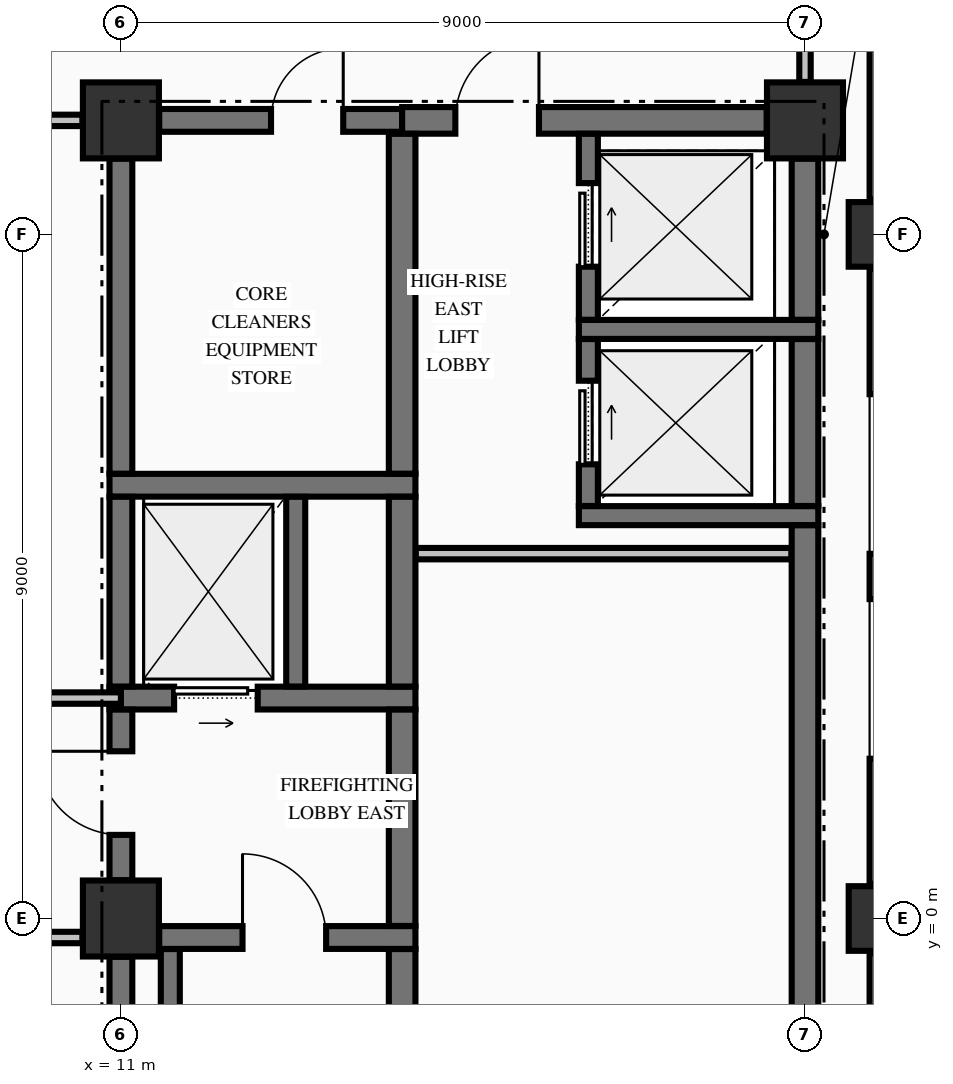
"""IFC4 building model, lengths in metres.
Left out: names, types, materials, properties, quantities, classifications, styles, units other than length and angle.
Written with IfcOpenShell. Run it as: python <this file> out.ifc"""

import sys

from ifc_helpers import new_model, si_unit, direction, frame, frame_2d, origin, origin_2d, place, context, subcontext, project, spatial, rectangle, extrude, element, fill, save


model = new_model("IFC4")
c1 = context("Model", 3, precision=1e-05, world=origin(), true_north=direction((0.0, 1.0)))
c2 = subcontext(c1, "Body", "Model", "MODEL_VIEW")
j1 = project(units=[si_unit("LENGTHUNIT", "METRE"), si_unit("PLANEANGLEUNIT", "RADIAN")], contexts=[c1])
p1 = place(None, origin())
s1 = spatial("IfcSite", under=j1, at=p1, CompositionType="ELEMENT")
p2 = place(p1, origin())
s2 = spatial("IfcBuilding", under=s1, at=p2, CompositionType="ELEMENT")
p3 = place(p2, frame((0.0, 0.0, 278.06)))
s3 = spatial("IfcBuildingStorey", under=s2, at=p3, CompositionType="ELEMENT", Elevation=278.06)
for number, where, z_axis, x_axis in (
    (1, (21.0, 0.0, -0.425), (0.0, 0.0, 1.0), (1.0, 0.0, 0.0)),
    (2, (21.0, 9.0, -0.425), (0.0, 0.0, 1.0), (1.0, 0.0, 0.0)),
):
    element("IfcColumn", number, at=place(p3, frame(where, z_axis=z_axis, x_axis=x_axis)), inside=s3, PredefinedType="COLUMN", context=c2, shape_type="SweptSolid", body=[
        extrude(rectangle(XDim=0.85, YDim=0.85, at=origin_2d()), origin(), (0.0, 0.0, 1.0), 3.84),
    ])
for number, where, z_axis, x_axis in (
    (3, (11.0, 0.0, -0.425), (0.0, 0.0, 1.0), (1.0, 0.0, 0.0)),
    (4, (11.0, 10.5, -0.425), (0.0, 0.0, 1.0), (1.0, 0.0, 0.0)),
    (5, (20.0, 10.5, -0.425), (0.0, 0.0, 1.0), (1.0, 0.0, 0.0)),
):
    element("IfcColumn", number, at=place(p3, frame(where, z_axis=z_axis, x_axis=x_axis)), inside=s3, PredefinedType="COLUMN", context=c2, shape_type="SweptSolid", body=[
        extrude(rectangle(XDim=1.0, YDim=1.0, at=origin_2d()), origin(), (0.0, 0.0, 1.0), 3.84),
    ])
p4 = place(p3, frame((21.0, -8.545, 0.0), z_axis=(0.0, 0.0, 1.0), x_axis=(0.0, 1.0, 0.0)))
e6 = element("IfcWall", 6, at=p4, inside=s3, PredefinedType="STANDARD", context=c2, shape_type="SweptSolid", body=[
    extrude(rectangle(XDim=8.09, YDim=0.3, at=frame_2d((4.045, 0.0))), origin(), (0.0, 0.0, 1.0), 2.807),
])
p5 = place(p4, frame((1.647, 0.0, 0.7)))
e7 = element("IfcOpeningElement", 7, at=p5, cuts=e6, PredefinedType="OPENING", context=c2, shape_type="SweptSolid", body=[
    extrude(rectangle(XDim=2.1, YDim=1.5, at=frame_2d((1.05, 0.75))), frame((0.0, 0.16, 0.0), z_axis=(0.0, -1.0, 0.0), x_axis=(1.0, 0.0, 0.0)), (0.0, 0.0, 1.0), 0.32),
])
p6 = place(p4, frame((4.343, 0.0, 0.7)))
e8 = element("IfcOpeningElement", 8, at=p6, cuts=e6, PredefinedType="OPENING", context=c2, shape_type="SweptSolid", body=[
    extrude(rectangle(XDim=2.1, YDim=1.5, at=frame_2d((1.05, 0.75))), frame((0.0, 0.16, 0.0), z_axis=(0.0, -1.0, 0.0), x_axis=(1.0, 0.0, 0.0)), (0.0, 0.0, 1.0), 0.32),
])
p7 = place(p3, frame((21.0, 0.455, 0.0), z_axis=(0.0, 0.0, 1.0), x_axis=(0.0, 1.0, 0.0)))
e9 = element("IfcWall", 9, at=p7, inside=s3, PredefinedType="STANDARD", context=c2, shape_type="SweptSolid", body=[
    extrude(rectangle(XDim=8.09, YDim=0.3, at=frame_2d((4.045, 0.0))), origin(), (0.0, 0.0, 1.0), 2.807),
])
p8 = place(p7, frame((1.647, 0.0, 0.7)))
e10 = element("IfcOpeningElement", 10, at=p8, cuts=e9, PredefinedType="OPENING", context=c2, shape_type="SweptSolid", body=[
    extrude(rectangle(XDim=2.1, YDim=1.5, at=frame_2d((1.05, 0.75))), frame((0.0, 0.16, 0.0), z_axis=(0.0, -1.0, 0.0), x_axis=(1.0, 0.0, 0.0)), (0.0, 0.0, 1.0), 0.32),
])
p9 = place(p7, frame((4.343, 0.0, 0.7)))
e11 = element("IfcOpeningElement", 11, at=p9, cuts=e9, PredefinedType="OPENING", context=c2, shape_type="SweptSolid", body=[
    extrude(rectangle(XDim=2.1, YDim=1.5, at=frame_2d((1.05, 0.75))), frame((0.0, 0.16, 0.0), z_axis=(0.0, -1.0, 0.0), x_axis=(1.0, 0.0, 0.0)), (0.0, 0.0, 1.0), 0.32),
])
p10 = place(p3, frame((21.0, 9.455, 0.0), z_axis=(0.0, 0.0, 1.0), x_axis=(0.0, 1.0, 0.0)))
e12 = element("IfcWall", 12, at=p10, inside=s3, PredefinedType="STANDARD", context=c2, shape_type="SweptSolid", body=[
    extrude(rectangle(XDim=8.09, YDim=0.3, at=frame_2d((4.045, 0.0))), origin(), (0.0, 0.0, 1.0), 1.607),
])
p11 = place(p3, frame((11.504, -0.25, 0.0), z_axis=(0.0, 0.0, 1.0), x_axis=(1.0, 0.0, 0.0)))
e13 = element("IfcWall", 13, at=p11, inside=s3, PredefinedType="SHEAR", context=c2, shape_type="SweptSolid", body=[
    extrude(rectangle(XDim=3.371, YDim=0.3, at=frame_2d((1.686, 0.0))), origin(), (0.0, 0.0, 1.0), 3.415),
])
p12 = place(p11, frame((1.096, 0.0, 0.0)))
e14 = element("IfcOpeningElement", 14, at=p12, cuts=e13, PredefinedType="OPENING", context=c2, shape_type="SweptSolid", body=[
    extrude(rectangle(XDim=1.1, YDim=2.15, at=frame_2d((0.55, 1.075))), frame((0.0, 0.16, 0.0), z_axis=(0.0, -1.0, 0.0), x_axis=(1.0, 0.0, 0.0)), (0.0, 0.0, 1.0), 0.32),
])
p13 = place(p3, frame((10.85, 2.9, 0.0), z_axis=(0.0, 0.0, 1.0), x_axis=(1.0, 0.0, 0.0)))
e15 = element("IfcWall", 15, at=p13, inside=s3, PredefinedType="SHEAR", context=c2, shape_type="SweptSolid", body=[
    extrude(rectangle(XDim=4.025, YDim=0.3, at=frame_2d((2.012, 0.0))), origin(), (0.0, 0.0, 1.0), 3.415),
])
p14 = place(p13, frame((0.85, 0.0, 0.0)))
e16 = element("IfcOpeningElement", 16, at=p14, cuts=e15, PredefinedType="OPENING", context=c2, shape_type="SweptSolid", body=[
    extrude(rectangle(XDim=1.1, YDim=2.2, at=frame_2d((0.55, 1.1))), frame((0.0, 0.16, 0.0), z_axis=(0.0, -1.0, 0.0), x_axis=(1.0, 0.0, 0.0)), (0.0, 0.0, 1.0), 0.32),
])
p15 = place(p3, frame((17.025, 5.3, 0.0), z_axis=(0.0, 0.0, 1.0), x_axis=(1.0, 0.0, 0.0)))
e17 = element("IfcWall", 17, at=p15, inside=s3, PredefinedType="SOLIDWALL", context=c2, shape_type="SweptSolid", body=[
    extrude(rectangle(XDim=3.15, YDim=0.25, at=frame_2d((1.575, 0.0))), origin(), (0.0, 0.0, 1.0), 3.415),
])
p16 = place(p3, frame((10.85, 5.7, 0.0), z_axis=(0.0, 0.0, 1.0), x_axis=(1.0, 0.0, 0.0)))
e18 = element("IfcWall", 18, at=p16, inside=s3, PredefinedType="SHEAR", context=c2, shape_type="SweptSolid", body=[
    extrude(rectangle(XDim=4.025, YDim=0.3, at=frame_2d((2.012, 0.0))), origin(), (0.0, 0.0, 1.0), 3.415),
])
p17 = place(p3, frame((17.025, 7.75, 0.0), z_axis=(0.0, 0.0, 1.0), x_axis=(1.0, 0.0, 0.0)))
e19 = element("IfcWall", 19, at=p17, inside=s3, PredefinedType="SOLIDWALL", context=c2, shape_type="SweptSolid", body=[
    extrude(rectangle(XDim=3.15, YDim=0.25, at=frame_2d((1.575, 0.0))), origin(), (0.0, 0.0, 1.0), 3.415),
])
p18 = place(p3, frame((11.504, 10.5, 0.0), z_axis=(0.0, 0.0, 1.0), x_axis=(1.0, 0.0, 0.0)))
e20 = element("IfcWall", 20, at=p18, inside=s3, PredefinedType="SHEAR", context=c2, shape_type="SweptSolid", body=[
    extrude(rectangle(XDim=3.196, YDim=0.3, at=frame_2d((1.598, 0.0))), origin(), (0.0, 0.0, 1.0), 3.415),
])
p19 = place(p18, frame((1.471, 0.0, 0.0)))
e21 = element("IfcOpeningElement", 21, at=p19, cuts=e20, PredefinedType="OPENING", context=c2, shape_type="SweptSolid", body=[
    extrude(rectangle(XDim=0.95, YDim=2.15, at=frame_2d((0.475, 1.075))), frame((0.0, 0.16, 0.0), z_axis=(0.0, -1.0, 0.0), x_axis=(1.0, 0.0, 0.0)), (0.0, 0.0, 1.0), 0.32),
])
p20 = place(p3, frame((14.7, 10.5, 0.0), z_axis=(0.0, 0.0, 1.0), x_axis=(1.0, 0.0, 0.0)))
e22 = element("IfcWall", 22, at=p20, inside=s3, PredefinedType="SHEAR", context=c2, shape_type="SweptSolid", body=[
    extrude(rectangle(XDim=4.796, YDim=0.35, at=frame_2d((2.398, 0.0))), origin(), (0.0, 0.0, 1.0), 3.415),
])
p21 = place(p20, frame((0.7, 0.0, 0.0)))
e23 = element("IfcOpeningElement", 23, at=p21, cuts=e22, PredefinedType="OPENING", context=c2, shape_type="SweptSolid", body=[
    extrude(rectangle(XDim=1.1, YDim=2.15, at=frame_2d((0.55, 1.075))), frame((0.0, 0.185, 0.0), z_axis=(0.0, -1.0, 0.0), x_axis=(1.0, 0.0, 0.0)), (0.0, 0.0, 1.0), 0.37),
])
p22 = place(p3, frame((-10.494, -0.25, 0.0), z_axis=(0.0, 0.0, 1.0), x_axis=(1.0, 0.0, 0.0)))
e24 = element("IfcWall", 24, at=p22, inside=s3, PredefinedType="PARTITIONING", context=c2, shape_type="SweptSolid", body=[
    extrude(rectangle(XDim=20.988, YDim=0.15, at=frame_2d((10.494, 0.0))), origin(), (0.0, 0.0, 1.0), 3.415),
])
p23 = place(p22, frame((6.244, 0.0, 0.0)))
e25 = element("IfcOpeningElement", 25, at=p23, cuts=e24, PredefinedType="OPENING", context=c2, shape_type="SweptSolid", body=[
    extrude(rectangle(XDim=1.1, YDim=2.15, at=frame_2d((0.55, 1.075))), frame((0.0, 0.085, 0.0), z_axis=(0.0, -1.0, 0.0), x_axis=(1.0, 0.0, 0.0)), (0.0, 0.0, 1.0), 0.17),
])
p24 = place(p22, frame((2.069, 0.0, 0.0)))
e26 = element("IfcOpeningElement", 26, at=p24, cuts=e24, PredefinedType="OPENING", context=c2, shape_type="SweptSolid", body=[
    extrude(rectangle(XDim=1.05, YDim=2.15, at=frame_2d((0.525, 1.075))), frame((0.0, 0.085, 0.0), z_axis=(0.0, -1.0, 0.0), x_axis=(1.0, 0.0, 0.0)), (0.0, 0.0, 1.0), 0.17),
])
p25 = place(p22, frame((14.219, 0.0, 0.0)))
e27 = element("IfcOpeningElement", 27, at=p25, cuts=e24, PredefinedType="OPENING", context=c2, shape_type="SweptSolid", body=[
    extrude(rectangle(XDim=0.95, YDim=2.15, at=frame_2d((0.475, 1.075))), frame((0.0, 0.085, 0.0), z_axis=(0.0, -1.0, 0.0), x_axis=(1.0, 0.0, 0.0)), (0.0, 0.0, 1.0), 0.17),
])
p26 = place(p3, frame((-11.0, 2.9, 0.0), z_axis=(0.0, 0.0, 1.0), x_axis=(1.0, 0.0, 0.0)))
e28 = element("IfcWall", 28, at=p26, inside=s3, PredefinedType="PARTITIONING", context=c2, shape_type="SweptSolid", body=[
    extrude(rectangle(XDim=22.0, YDim=0.15, at=frame_2d((11.0, 0.0))), origin(), (0.0, 0.0, 1.0), 3.415),
])
p27 = place(p26, frame((6.75, 0.0, 0.0)))
e29 = element("IfcOpeningElement", 29, at=p27, cuts=e28, PredefinedType="OPENING", context=c2, shape_type="SweptSolid", body=[
    extrude(rectangle(XDim=1.1, YDim=2.15, at=frame_2d((0.55, 1.075))), frame((0.0, 0.085, 0.0), z_axis=(0.0, -1.0, 0.0), x_axis=(1.0, 0.0, 0.0)), (0.0, 0.0, 1.0), 0.17),
])
p28 = place(p26, frame((2.575, 0.0, 0.0)))
e30 = element("IfcOpeningElement", 30, at=p28, cuts=e28, PredefinedType="OPENING", context=c2, shape_type="SweptSolid", body=[
    extrude(rectangle(XDim=1.05, YDim=2.15, at=frame_2d((0.525, 1.075))), frame((0.0, 0.085, 0.0), z_axis=(0.0, -1.0, 0.0), x_axis=(1.0, 0.0, 0.0)), (0.0, 0.0, 1.0), 0.17),
])
p29 = place(p26, frame((14.65, 0.0, 0.0)))
e31 = element("IfcOpeningElement", 31, at=p29, cuts=e28, PredefinedType="OPENING", context=c2, shape_type="SweptSolid", body=[
    extrude(rectangle(XDim=1.1, YDim=2.15, at=frame_2d((0.55, 1.075))), frame((0.0, 0.085, 0.0), z_axis=(0.0, -1.0, 0.0), x_axis=(1.0, 0.0, 0.0)), (0.0, 0.0, 1.0), 0.17),
])
p30 = place(p3, frame((14.878, 4.8, 0.0), z_axis=(0.0, 0.0, 1.0), x_axis=(1.0, 0.0, 0.0)))
e32 = element("IfcWall", 32, at=p30, inside=s3, PredefinedType="PARTITIONING", context=c2, shape_type="SweptSolid", body=[
    extrude(rectangle(XDim=4.944, YDim=0.15, at=frame_2d((2.472, 0.0))), origin(), (0.0, 0.0, 1.0), 3.415),
])
p31 = place(p3, frame((-10.494, 10.5, 0.0), z_axis=(0.0, 0.0, 1.0), x_axis=(1.0, 0.0, 0.0)))
e33 = element("IfcWall", 33, at=p31, inside=s3, PredefinedType="PARTITIONING", context=c2, shape_type="SweptSolid", body=[
    extrude(rectangle(XDim=20.988, YDim=0.15, at=frame_2d((10.494, 0.0))), origin(), (0.0, 0.0, 1.0), 3.415),
])
p32 = place(p31, frame((6.244, 0.0, 0.0)))
e34 = element("IfcOpeningElement", 34, at=p32, cuts=e33, PredefinedType="OPENING", context=c2, shape_type="SweptSolid", body=[
    extrude(rectangle(XDim=1.1, YDim=2.15, at=frame_2d((0.55, 1.075))), frame((0.0, 0.085, 0.0), z_axis=(0.0, -1.0, 0.0), x_axis=(1.0, 0.0, 0.0)), (0.0, 0.0, 1.0), 0.17),
])
p33 = place(p3, frame((11.0, -9.446, 0.0), z_axis=(0.0, 0.0, 1.0), x_axis=(0.0, 1.0, 0.0)))
e35 = element("IfcWall", 35, at=p33, inside=s3, PredefinedType="SHEAR", context=c2, shape_type="SweptSolid", body=[
    extrude(rectangle(XDim=8.942, YDim=0.3, at=frame_2d((4.471, 0.0))), origin(), (0.0, 0.0, 1.0), 3.415),
])
p34 = place(p3, frame((11.0, 0.504, 0.0), z_axis=(0.0, 0.0, 1.0), x_axis=(0.0, 1.0, 0.0)))
e36 = element("IfcWall", 36, at=p34, inside=s3, PredefinedType="SHEAR", context=c2, shape_type="SweptSolid", body=[
    extrude(rectangle(XDim=2.244, YDim=0.3, at=frame_2d((1.122, 0.0))), origin(), (0.0, 0.0, 1.0), 3.415),
])
p35 = place(p34, frame((0.596, 0.0, 0.0)))
e37 = element("IfcOpeningElement", 37, at=p35, cuts=e36, PredefinedType="OPENING", context=c2, shape_type="SweptSolid", body=[
    extrude(rectangle(XDim=1.1, YDim=2.15, at=frame_2d((0.55, 1.075))), frame((0.0, 0.16, 0.0), z_axis=(0.0, -1.0, 0.0), x_axis=(1.0, 0.0, 0.0)), (0.0, 0.0, 1.0), 0.32),
])
p36 = place(p3, frame((11.0, 3.052, 0.0), z_axis=(0.0, 0.0, 1.0), x_axis=(0.0, 1.0, 0.0)))
e38 = element("IfcWall", 38, at=p36, inside=s3, PredefinedType="SHEAR", context=c2, shape_type="SweptSolid", body=[
    extrude(rectangle(XDim=2.496, YDim=0.3, at=frame_2d((1.248, 0.0))), origin(), (0.0, 0.0, 1.0), 3.415),
])
p37 = place(p3, frame((11.0, 5.852, 0.0), z_axis=(0.0, 0.0, 1.0), x_axis=(0.0, 1.0, 0.0)))
e39 = element("IfcWall", 39, at=p37, inside=s3, PredefinedType="SHEAR", context=c2, shape_type="SweptSolid", body=[
    extrude(rectangle(XDim=4.144, YDim=0.3, at=frame_2d((2.072, 0.0))), origin(), (0.0, 0.0, 1.0), 3.415),
])
p38 = place(p3, frame((11.65, -9.798, 0.0), z_axis=(0.0, 0.0, 1.0), x_axis=(0.0, 1.0, 0.0)))
e40 = element("IfcWall", 40, at=p38, inside=s3, PredefinedType="SOLIDWALL", context=c2, shape_type="SweptSolid", body=[
    extrude(rectangle(XDim=9.396, YDim=0.25, at=frame_2d((4.698, 0.0))), origin(), (0.0, 0.0, 1.0), 3.415),
])
p39 = place(p3, frame((13.3, 3.052, 0.0), z_axis=(0.0, 0.0, 1.0), x_axis=(0.0, 1.0, 0.0)))
e41 = element("IfcWall", 41, at=p39, inside=s3, PredefinedType="SOLIDWALL", context=c2, shape_type="SweptSolid", body=[
    extrude(rectangle(XDim=2.496, YDim=0.25, at=frame_2d((1.248, 0.0))), origin(), (0.0, 0.0, 1.0), 3.415),
])
p40 = place(p3, frame((14.7, -9.773, 0.0), z_axis=(0.0, 0.0, 1.0), x_axis=(0.0, 1.0, 0.0)))
e42 = element("IfcWall", 42, at=p40, inside=s3, PredefinedType="SHEAR", context=c2, shape_type="SweptSolid", body=[
    extrude(rectangle(XDim=9.371, YDim=0.35, at=frame_2d((4.686, 0.0))), origin(), (0.0, 0.0, 1.0), 3.415),
])
p41 = place(p3, frame((14.7, -0.098, 0.0), z_axis=(0.0, 0.0, 1.0), x_axis=(0.0, 1.0, 0.0)))
e43 = element("IfcWall", 43, at=p41, inside=s3, PredefinedType="SHEAR", context=c2, shape_type="SweptSolid", body=[
    extrude(rectangle(XDim=2.846, YDim=0.35, at=frame_2d((1.423, 0.0))), origin(), (0.0, 0.0, 1.0), 3.415),
])
p42 = place(p3, frame((14.7, 3.052, 0.0), z_axis=(0.0, 0.0, 1.0), x_axis=(0.0, 1.0, 0.0)))
e44 = element("IfcWall", 44, at=p42, inside=s3, PredefinedType="SHEAR", context=c2, shape_type="SweptSolid", body=[
    extrude(rectangle(XDim=2.496, YDim=0.35, at=frame_2d((1.248, 0.0))), origin(), (0.0, 0.0, 1.0), 3.415),
])
p43 = place(p3, frame((14.7, 5.852, 0.0), z_axis=(0.0, 0.0, 1.0), x_axis=(0.0, 1.0, 0.0)))
e45 = element("IfcWall", 45, at=p43, inside=s3, PredefinedType="SHEAR", context=c2, shape_type="SweptSolid", body=[
    extrude(rectangle(XDim=4.471, YDim=0.35, at=frame_2d((2.235, 0.0))), origin(), (0.0, 0.0, 1.0), 3.415),
])
p44 = place(p3, frame((17.15, 5.427, 0.0), z_axis=(0.0, 0.0, 1.0), x_axis=(0.0, 1.0, 0.0)))
e46 = element("IfcWall", 46, at=p44, inside=s3, PredefinedType="SOLIDWALL", context=c2, shape_type="SweptSolid", body=[
    extrude(rectangle(XDim=2.196, YDim=0.25, at=frame_2d((1.098, 0.0))), origin(), (0.0, 0.0, 1.0), 3.415),
])
p45 = place(p44, frame((0.548, 0.0, 0.0)))
e47 = element("IfcOpeningElement", 47, at=p45, cuts=e46, PredefinedType="OPENING", context=c2, shape_type="SweptSolid", body=[
    extrude(rectangle(XDim=1.1, YDim=2.2, at=frame_2d((0.55, 1.1))), frame((0.0, 0.135, 0.0), z_axis=(0.0, -1.0, 0.0), x_axis=(1.0, 0.0, 0.0)), (0.0, 0.0, 1.0), 0.27),
])
p46 = place(p3, frame((17.15, 7.877, 0.0), z_axis=(0.0, 0.0, 1.0), x_axis=(0.0, 1.0, 0.0)))
e48 = element("IfcWall", 48, at=p46, inside=s3, PredefinedType="SOLIDWALL", context=c2, shape_type="SweptSolid", body=[
    extrude(rectangle(XDim=2.446, YDim=0.25, at=frame_2d((1.223, 0.0))), origin(), (0.0, 0.0, 1.0), 3.415),
])
p47 = place(p46, frame((0.698, 0.0, 0.0)))
e49 = element("IfcOpeningElement", 49, at=p47, cuts=e48, PredefinedType="OPENING", context=c2, shape_type="SweptSolid", body=[
    extrude(rectangle(XDim=1.1, YDim=2.2, at=frame_2d((0.55, 1.1))), frame((0.0, 0.135, 0.0), z_axis=(0.0, -1.0, 0.0), x_axis=(1.0, 0.0, 0.0)), (0.0, 0.0, 1.0), 0.27),
])
p48 = place(p3, frame((20.0, -9.446, 0.0), z_axis=(0.0, 0.0, 1.0), x_axis=(0.0, 1.0, 0.0)))
e50 = element("IfcWall", 50, at=p48, inside=s3, PredefinedType="SHEAR", context=c2, shape_type="SweptSolid", body=[
    extrude(rectangle(XDim=14.619, YDim=0.35, at=frame_2d((7.31, 0.0))), origin(), (0.0, 0.0, 1.0), 3.415),
])
p49 = place(p3, frame((20.0, 5.427, 0.0), z_axis=(0.0, 0.0, 1.0), x_axis=(0.0, 1.0, 0.0)))
e51 = element("IfcWall", 51, at=p49, inside=s3, PredefinedType="SHEAR", context=c2, shape_type="SweptSolid", body=[
    extrude(rectangle(XDim=2.196, YDim=0.35, at=frame_2d((1.098, 0.0))), origin(), (0.0, 0.0, 1.0), 3.415),
])
p50 = place(p3, frame((20.0, 7.877, 0.0), z_axis=(0.0, 0.0, 1.0), x_axis=(0.0, 1.0, 0.0)))
e52 = element("IfcWall", 52, at=p50, inside=s3, PredefinedType="SHEAR", context=c2, shape_type="SweptSolid", body=[
    extrude(rectangle(XDim=2.119, YDim=0.35, at=frame_2d((1.06, 0.0))), origin(), (0.0, 0.0, 1.0), 3.415),
])
p51 = place(p3, frame((20.0, 11.006, 0.0), z_axis=(0.0, 0.0, 1.0), x_axis=(0.0, 1.0, 0.0)))
e53 = element("IfcWall", 53, at=p51, inside=s3, PredefinedType="PARTITIONING", context=c2, shape_type="SweptSolid", body=[
    extrude(rectangle(XDim=2.066, YDim=0.15, at=frame_2d((1.033, 0.0))), origin(), (0.0, 0.0, 1.0), 3.005),
])
p52 = place(p12, origin())
e54 = element("IfcDoor", 54, at=p52, inside=s3, OperationType="SINGLE_SWING_LEFT", PredefinedType="DOOR", context=c2, shape_type="SweptSolid", body=[
    extrude(rectangle(XDim=1.1, YDim=2.15, at=frame_2d((0.55, 1.075))), frame((0.0, 0.025, 0.0), z_axis=(0.0, -1.0, 0.0), x_axis=(1.0, 0.0, 0.0)), (0.0, 0.0, 1.0), 0.05),
])
fill(e14, e54)
p53 = place(p35, origin())
e55 = element("IfcDoor", 55, at=p53, inside=s3, OperationType="SINGLE_SWING_RIGHT", PredefinedType="DOOR", context=c2, shape_type="SweptSolid", body=[
    extrude(rectangle(XDim=1.1, YDim=2.15, at=frame_2d((0.55, 1.075))), frame((0.0, 0.025, 0.0), z_axis=(0.0, -1.0, 0.0), x_axis=(1.0, 0.0, 0.0)), (0.0, 0.0, 1.0), 0.05),
])
fill(e37, e55)
p54 = place(p14, origin())
e56 = element("IfcDoor", 56, at=p54, inside=s3, OperationType="SLIDING_TO_RIGHT", PredefinedType="DOOR", context=c2, shape_type="SweptSolid", body=[
    extrude(rectangle(XDim=1.1, YDim=2.2, at=frame_2d((0.55, 1.1))), frame((0.0, 0.025, 0.0), z_axis=(0.0, -1.0, 0.0), x_axis=(1.0, 0.0, 0.0)), (0.0, 0.0, 1.0), 0.05),
])
fill(e16, e56)
p55 = place(p19, origin())
e57 = element("IfcDoor", 57, at=p55, inside=s3, OperationType="SINGLE_SWING_RIGHT", PredefinedType="DOOR", context=c2, shape_type="SweptSolid", body=[
    extrude(rectangle(XDim=0.95, YDim=2.15, at=frame_2d((0.475, 1.075))), frame((0.0, 0.025, 0.0), z_axis=(0.0, -1.0, 0.0), x_axis=(1.0, 0.0, 0.0)), (0.0, 0.0, 1.0), 0.05),
])
fill(e21, e57)
p56 = place(p45, origin())
e58 = element("IfcDoor", 58, at=p56, inside=s3, OperationType="SLIDING_TO_RIGHT", PredefinedType="DOOR", context=c2, shape_type="SweptSolid", body=[
    extrude(rectangle(XDim=1.1, YDim=2.2, at=frame_2d((0.55, 1.1))), frame((0.0, 0.025, 0.0), z_axis=(0.0, -1.0, 0.0), x_axis=(1.0, 0.0, 0.0)), (0.0, 0.0, 1.0), 0.05),
])
fill(e47, e58)
p57 = place(p47, origin())
e59 = element("IfcDoor", 59, at=p57, inside=s3, OperationType="SLIDING_TO_RIGHT", PredefinedType="DOOR", context=c2, shape_type="SweptSolid", body=[
    extrude(rectangle(XDim=1.1, YDim=2.2, at=frame_2d((0.55, 1.1))), frame((0.0, 0.025, 0.0), z_axis=(0.0, -1.0, 0.0), x_axis=(1.0, 0.0, 0.0)), (0.0, 0.0, 1.0), 0.05),
])
fill(e49, e59)
p58 = place(p21, origin())
e60 = element("IfcDoor", 60, at=p58, inside=s3, OperationType="SINGLE_SWING_RIGHT", PredefinedType="DOOR", context=c2, shape_type="SweptSolid", body=[
    extrude(rectangle(XDim=1.1, YDim=2.15, at=frame_2d((0.55, 1.075))), frame((0.0, 0.025, 0.0), z_axis=(0.0, -1.0, 0.0), x_axis=(1.0, 0.0, 0.0)), (0.0, 0.0, 1.0), 0.05),
])
fill(e23, e60)
save(model, sys.argv[1])
